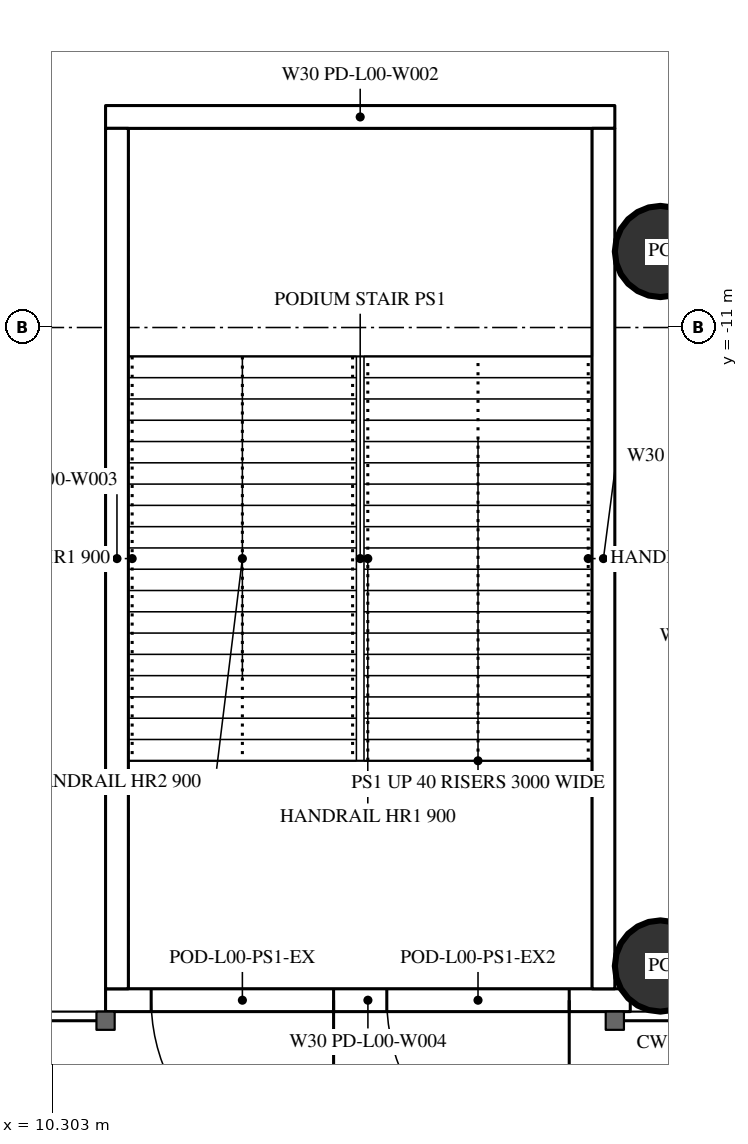
"""IFC4 building model, lengths in metres.
Left out: names, types, materials, properties, quantities, classifications, styles, units other than length and angle.
Written with IfcOpenShell. Run it as: python <this file> out.ifc"""

import sys

from ifc_helpers import new_model, si_unit, direction, frame, frame_2d, origin, origin_2d, place, context, subcontext, project, spatial, rectangle, circle, extrude, element, fill, save


model = new_model("IFC4")
c1 = context("Model", 3, precision=1e-05, world=origin(), true_north=direction((0.0, 1.0)))
c2 = subcontext(c1, "Body", "Model", "MODEL_VIEW")
j1 = project(units=[si_unit("LENGTHUNIT", "METRE"), si_unit("PLANEANGLEUNIT", "RADIAN")], contexts=[c1])
p1 = place(None, origin())
s1 = spatial("IfcSite", under=j1, at=p1, CompositionType="ELEMENT")
p2 = place(p1, origin())
s2 = spatial("IfcBuilding", under=s1, at=p2, CompositionType="ELEMENT")
p3 = place(p2, origin())
s3 = spatial("IfcBuildingStorey", under=s2, at=p3, CompositionType="ELEMENT", Elevation=0.0)
for number, where, z_axis, x_axis in (
    (1, (18.3, -19.4, 0.0), (0.0, 0.0, 1.0), (1.0, 0.0, 0.0)),
    (2, (18.3, -10.0, 0.0), (0.0, 0.0, 1.0), (1.0, 0.0, 0.0)),
):
    element("IfcColumn", number, at=place(p3, frame(where, z_axis=z_axis, x_axis=x_axis)), inside=s3, PredefinedType="COLUMN", context=c2, shape_type="SweptSolid", body=[
        extrude(circle(Radius=0.6, at=origin_2d()), origin(), (0.0, 0.0, 1.0), 7.2),
    ])
p4 = place(p3, frame((17.903, -19.85, 0.0), z_axis=(0.0, 0.0, 1.0), x_axis=(-1.0, 0.0, 0.0)))
e3 = element("IfcWall", 3, at=p4, inside=s3, PredefinedType="SOLIDWALL", context=c2, shape_type="SweptSolid", body=[
    extrude(rectangle(XDim=6.903, YDim=0.3, at=frame_2d((3.452, 0.0))), origin(), (0.0, 0.0, 1.0), 5.95),
])
p5 = place(p4, frame((3.903, 0.0, 0.0)))
e4 = element("IfcOpeningElement", 4, at=p5, cuts=e3, PredefinedType="OPENING", context=c2, shape_type="SweptSolid", body=[
    extrude(rectangle(XDim=2.4, YDim=2.2, at=frame_2d((1.2, 1.1))), frame((0.0, 0.16, 0.0), z_axis=(0.0, -1.0, 0.0), x_axis=(1.0, 0.0, 0.0)), (0.0, 0.0, 1.0), 0.32),
])
p6 = place(p4, frame((0.803, 0.0, 0.0)))
e5 = element("IfcOpeningElement", 5, at=p6, cuts=e3, PredefinedType="OPENING", context=c2, shape_type="SweptSolid", body=[
    extrude(rectangle(XDim=2.4, YDim=2.2, at=frame_2d((1.2, 1.1))), frame((0.0, 0.16, 0.0), z_axis=(0.0, -1.0, 0.0), x_axis=(1.0, 0.0, 0.0)), (0.0, 0.0, 1.0), 0.32),
])
p7 = place(p3, frame((11.0, -8.23, 0.0), z_axis=(0.0, 0.0, 1.0), x_axis=(1.0, 0.0, 0.0)))
e6 = element("IfcWall", 6, at=p7, inside=s3, PredefinedType="SOLIDWALL", context=c2, shape_type="SweptSolid", body=[
    extrude(rectangle(XDim=6.7, YDim=0.3, at=frame_2d((3.35, 0.0))), origin(), (0.0, 0.0, 1.0), 6.85),
])
for number, where, z_axis, x_axis in (
    (7, (11.15, -8.38, 0.0), (0.0, 0.0, 1.0), (0.0, -1.0, 0.0)),
    (8, (17.55, -8.38, 0.0), (0.0, 0.0, 1.0), (0.0, -1.0, 0.0)),
):
    element("IfcWall", number, at=place(p3, frame(where, z_axis=z_axis, x_axis=x_axis)), inside=s3, PredefinedType="SOLIDWALL", context=c2, shape_type="SweptSolid", body=[
        extrude(rectangle(XDim=11.32, YDim=0.3, at=frame_2d((5.66, 0.0))), origin(), (0.0, 0.0, 1.0), 6.85),
    ])
p8 = place(p5, origin())
e9 = element("IfcDoor", 9, at=p8, inside=s3, OperationType="DOUBLE_DOOR_SINGLE_SWING", PredefinedType="DOOR", context=c2, shape_type="SweptSolid", body=[
    extrude(rectangle(XDim=2.4, YDim=2.2, at=frame_2d((1.2, 1.1))), frame((0.0, 0.025, 0.0), z_axis=(0.0, -1.0, 0.0), x_axis=(1.0, 0.0, 0.0)), (0.0, 0.0, 1.0), 0.05),
])
fill(e4, e9)
p9 = place(p6, origin())
e10 = element("IfcDoor", 10, at=p9, inside=s3, OperationType="DOUBLE_DOOR_SINGLE_SWING", PredefinedType="DOOR", context=c2, shape_type="SweptSolid", body=[
    extrude(rectangle(XDim=2.4, YDim=2.2, at=frame_2d((1.2, 1.1))), frame((0.0, 0.025, 0.0), z_axis=(0.0, -1.0, 0.0), x_axis=(1.0, 0.0, 0.0)), (0.0, 0.0, 1.0), 0.05),
])
fill(e5, e10)
save(model, sys.argv[1])
